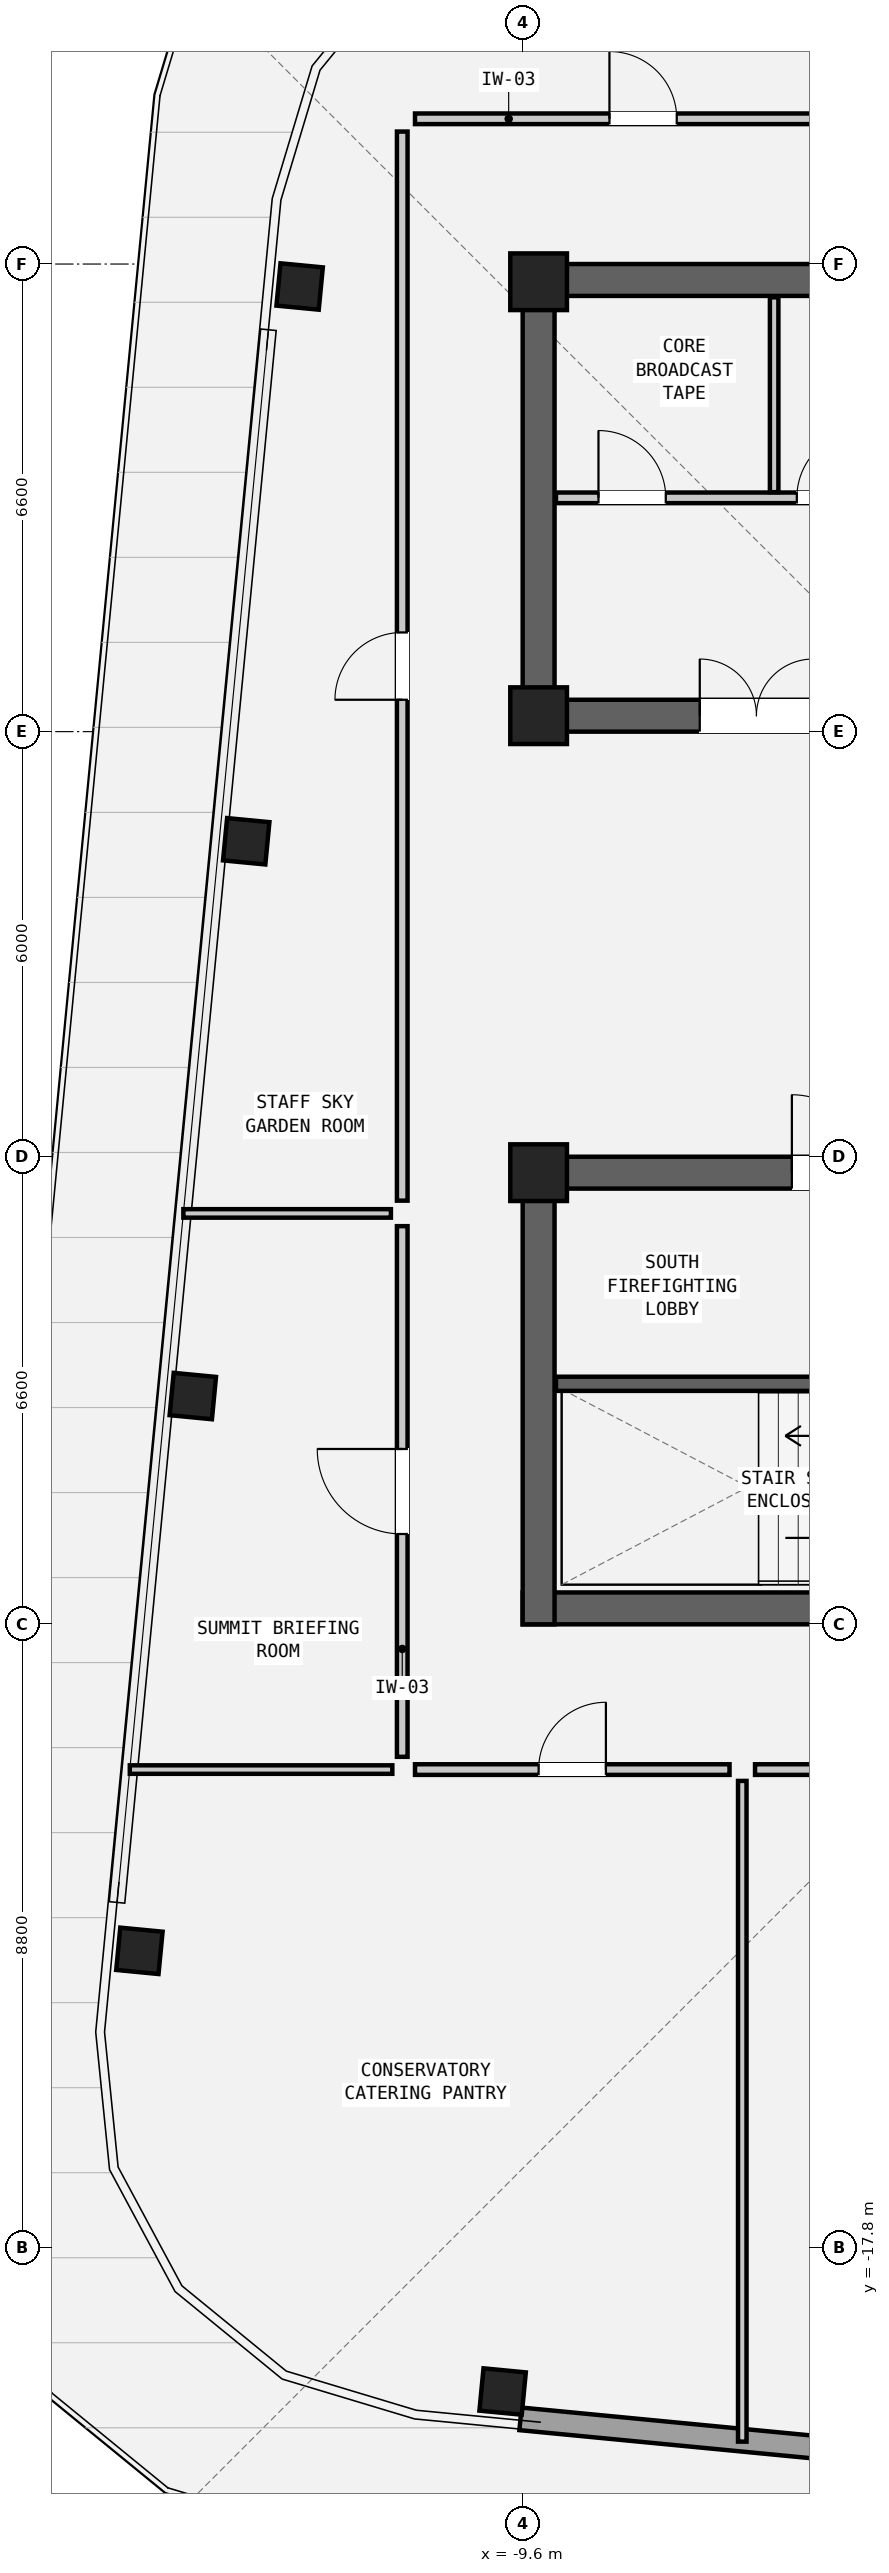
"""IFC4 building model, lengths in metres.
Left out: names, types, materials, properties, quantities, classifications, styles, units other than length and angle.
Written with IfcOpenShell. Run it as: python <this file> out.ifc"""

import sys

from ifc_helpers import new_model, si_unit, direction, frame, frame_2d, origin, origin_2d, place, context, subcontext, project, spatial, rectangle, hollow_rectangle, extrude, element, fill, save


model = new_model("IFC4")
c1 = context("Model", 3, precision=1e-05, world=origin(), true_north=direction((0.0, 1.0)))
c2 = subcontext(c1, "Body", "Model", "MODEL_VIEW")
j1 = project(units=[si_unit("LENGTHUNIT", "METRE"), si_unit("PLANEANGLEUNIT", "RADIAN")], contexts=[c1])
p1 = place(None, origin())
s1 = spatial("IfcSite", under=j1, at=p1, CompositionType="ELEMENT")
p2 = place(p1, origin())
s2 = spatial("IfcBuilding", under=s1, at=p2, CompositionType="ELEMENT")
p3 = place(p2, frame((0.0, 0.0, 273.35)))
s3 = spatial("IfcBuildingStorey", under=s2, at=p3, CompositionType="ELEMENT", Elevation=273.35)
p4 = place(p3, frame((-9.6, 9.975, 0.0), z_axis=(0.0, 0.0, 1.0), x_axis=(1.0, 0.0, 0.0)))
e1 = element("IfcWall", 1, at=p4, inside=s3, PredefinedType="SHEAR", context=c2, shape_type="SweptSolid", body=[
    extrude(rectangle(XDim=19.2, YDim=0.45, at=frame_2d((9.6, 0.0))), origin(), (0.0, 0.0, 1.0), 3.6),
])
p5 = place(p3, frame((-9.6, 3.825, 0.0), z_axis=(0.0, 0.0, 1.0), x_axis=(1.0, 0.0, 0.0)))
e2 = element("IfcWall", 2, at=p5, inside=s3, PredefinedType="SHEAR", context=c2, shape_type="SweptSolid", body=[
    extrude(rectangle(XDim=19.2, YDim=0.45, at=frame_2d((9.6, 0.0))), origin(), (0.0, 0.0, 1.0), 3.6),
])
p6 = place(p5, frame((14.2, 0.0, 0.0)))
e3 = element("IfcOpeningElement", 3, at=p6, cuts=e2, PredefinedType="OPENING", context=c2, shape_type="SweptSolid", body=[
    extrude(rectangle(XDim=1.1, YDim=2.08, at=frame_2d((0.55, 1.04))), frame((0.0, 0.237, 0.0), z_axis=(0.0, -1.0, 0.0), x_axis=(1.0, 0.0, 0.0)), (0.0, 0.0, 1.0), 0.474),
])
p7 = place(p5, frame((8.2, 0.0, 0.0)))
e4 = element("IfcOpeningElement", 4, at=p7, cuts=e2, PredefinedType="OPENING", context=c2, shape_type="SweptSolid", body=[
    extrude(rectangle(XDim=1.15, YDim=2.1, at=frame_2d((0.575, 1.05))), frame((0.0, 0.237, 0.0), z_axis=(0.0, -1.0, 0.0), x_axis=(1.0, 0.0, 0.0)), (0.0, 0.0, 1.0), 0.474),
])
p8 = place(p5, frame((2.5, 0.0, 0.0)))
e5 = element("IfcOpeningElement", 5, at=p8, cuts=e2, PredefinedType="OPENING", context=c2, shape_type="SweptSolid", body=[
    extrude(rectangle(XDim=1.6, YDim=2.12, at=frame_2d((0.8, 1.06))), frame((0.0, 0.237, 0.0), z_axis=(0.0, -1.0, 0.0), x_axis=(1.0, 0.0, 0.0)), (0.0, 0.0, 1.0), 0.474),
])
p9 = place(p3, frame((-9.375, 3.6, 0.0), z_axis=(0.0, 0.0, 1.0), x_axis=(0.0, 1.0, 0.0)))
e6 = element("IfcWall", 6, at=p9, inside=s3, PredefinedType="SHEAR", context=c2, shape_type="SweptSolid", body=[
    extrude(rectangle(XDim=6.6, YDim=0.45, at=frame_2d((3.3, 0.0))), origin(), (0.0, 0.0, 1.0), 3.6),
])
p10 = place(p3, frame((-9.6, -8.775, 0.0), z_axis=(0.0, 0.0, 1.0), x_axis=(1.0, 0.0, 0.0)))
e7 = element("IfcWall", 7, at=p10, inside=s3, PredefinedType="SHEAR", context=c2, shape_type="SweptSolid", body=[
    extrude(rectangle(XDim=19.2, YDim=0.45, at=frame_2d((9.6, 0.0))), origin(), (0.0, 0.0, 1.0), 3.6),
])
p11 = place(p3, frame((-9.6, -2.625, 0.0), z_axis=(0.0, 0.0, 1.0), x_axis=(1.0, 0.0, 0.0)))
e8 = element("IfcWall", 8, at=p11, inside=s3, PredefinedType="SHEAR", context=c2, shape_type="SweptSolid", body=[
    extrude(rectangle(XDim=19.2, YDim=0.45, at=frame_2d((9.6, 0.0))), origin(), (0.0, 0.0, 1.0), 3.6),
])
p12 = place(p11, frame((3.8, 0.0, 0.0)))
e9 = element("IfcOpeningElement", 9, at=p12, cuts=e8, PredefinedType="OPENING", context=c2, shape_type="SweptSolid", body=[
    extrude(rectangle(XDim=1.1, YDim=2.08, at=frame_2d((0.55, 1.04))), frame((0.0, 0.237, 0.0), z_axis=(0.0, -1.0, 0.0), x_axis=(1.0, 0.0, 0.0)), (0.0, 0.0, 1.0), 0.474),
])
p13 = place(p11, frame((10.15, 0.0, 0.0)))
e10 = element("IfcOpeningElement", 10, at=p13, cuts=e8, PredefinedType="OPENING", context=c2, shape_type="SweptSolid", body=[
    extrude(rectangle(XDim=0.9, YDim=2.05, at=frame_2d((0.45, 1.025))), frame((0.0, 0.237, 0.0), z_axis=(0.0, -1.0, 0.0), x_axis=(1.0, 0.0, 0.0)), (0.0, 0.0, 1.0), 0.474),
])
p14 = place(p11, frame((12.1, 0.0, 0.0)))
e11 = element("IfcOpeningElement", 11, at=p14, cuts=e8, PredefinedType="OPENING", context=c2, shape_type="SweptSolid", body=[
    extrude(rectangle(XDim=0.95, YDim=2.1, at=frame_2d((0.475, 1.05))), frame((0.0, 0.237, 0.0), z_axis=(0.0, -1.0, 0.0), x_axis=(1.0, 0.0, 0.0)), (0.0, 0.0, 1.0), 0.474),
])
p15 = place(p11, frame((14.8, 0.0, 0.0)))
e12 = element("IfcOpeningElement", 12, at=p15, cuts=e8, PredefinedType="OPENING", context=c2, shape_type="SweptSolid", body=[
    extrude(rectangle(XDim=1.6, YDim=2.12, at=frame_2d((0.8, 1.06))), frame((0.0, 0.237, 0.0), z_axis=(0.0, -1.0, 0.0), x_axis=(1.0, 0.0, 0.0)), (0.0, 0.0, 1.0), 0.474),
])
p16 = place(p3, frame((-9.375, -9.0, 0.0), z_axis=(0.0, 0.0, 1.0), x_axis=(0.0, 1.0, 0.0)))
e13 = element("IfcWall", 13, at=p16, inside=s3, PredefinedType="SHEAR", context=c2, shape_type="SweptSolid", body=[
    extrude(rectangle(XDim=6.6, YDim=0.45, at=frame_2d((3.3, 0.0))), origin(), (0.0, 0.0, 1.0), 3.6),
])
for number, where, z_axis, x_axis in (
    (14, (-9.883, -19.829, 0.0), (0.0, 0.0, 1.0), (0.995, -0.096, 0.0)),
    (15, (-12.749, 9.883, 0.0), (0.0, 0.0, 1.0), (0.096, 0.995, 0.0)),
    (16, (-13.502, 2.052, 0.0), (0.0, 0.0, 1.0), (0.096, 0.995, 0.0)),
    (17, (-14.256, -5.778, 0.0), (0.0, 0.0, 1.0), (0.096, 0.995, 0.0)),
    (18, (-15.01, -13.608, 0.0), (0.0, 0.0, 1.0), (0.096, 0.995, 0.0)),
):
    element("IfcColumn", number, at=place(p3, frame(where, z_axis=z_axis, x_axis=x_axis)), inside=s3, PredefinedType="COLUMN", context=c2, shape_type="SweptSolid", body=[
        extrude(hollow_rectangle(XDim=0.6, YDim=0.6, WallThickness=0.04, at=origin_2d()), origin(), (0.0, 0.0, 1.0), 3.6),
    ])
for number, where, z_axis, x_axis in (
    (19, (-9.375, 9.95, 0.0), (0.0, 0.0, 1.0), (1.0, 0.0, 0.0)),
    (20, (-9.375, 3.825, 0.0), (0.0, 0.0, 1.0), (1.0, 0.0, 0.0)),
    (21, (-9.375, -2.625, 0.0), (0.0, 0.0, 1.0), (1.0, 0.0, 0.0)),
):
    element("IfcColumn", number, at=place(p3, frame(where, z_axis=z_axis, x_axis=x_axis)), inside=s3, PredefinedType="COLUMN", context=c2, shape_type="SweptSolid", body=[
        extrude(rectangle(XDim=0.8, YDim=0.8, at=origin_2d()), origin(), (0.0, 0.0, 1.0), 3.6),
    ])
p17 = place(p3, frame((13.287, -22.421, 0.0), z_axis=(0.0, 0.0, 1.0), x_axis=(-0.995396042099, 0.095847375411, 0.0)))
e22 = element("IfcWall", 22, at=p17, inside=s3, PredefinedType="SOLIDWALL", context=c2, shape_type="SweptSolid", body=[
    extrude(rectangle(XDim=23.024, YDim=0.32, at=frame_2d((11.512, 0.0))), origin(), (0.0, 0.0, 1.0), 2.984),
])
p18 = place(p17, frame((3.811, 0.0, 0.0)))
e23 = element("IfcOpeningElement", 23, at=p18, cuts=e22, PredefinedType="OPENING", context=c2, shape_type="SweptSolid", body=[
    extrude(rectangle(XDim=1.25, YDim=2.02, at=frame_2d((0.625, 1.01))), frame((0.0, 0.172, 0.0), z_axis=(0.0, -1.0, 0.0), x_axis=(1.0, 0.0, 0.0)), (0.0, 0.0, 1.0), 0.344),
])
p19 = place(p3, frame((-9.13, 6.9, 0.0), z_axis=(0.0, 0.0, 1.0), x_axis=(1.0, 0.0, 0.0)))
e24 = element("IfcWall", 24, at=p19, inside=s3, PredefinedType="PARTITIONING", context=c2, shape_type="SweptSolid", body=[
    extrude(rectangle(XDim=6.01, YDim=0.15, at=frame_2d((3.005, 0.0))), origin(), (0.0, 0.0, 1.0), 3.41),
])
p20 = place(p19, frame((0.6, 0.0, 0.0)))
e25 = element("IfcOpeningElement", 25, at=p20, cuts=e24, PredefinedType="OPENING", context=c2, shape_type="SweptSolid", body=[
    extrude(rectangle(XDim=0.95, YDim=2.1, at=frame_2d((0.475, 1.05))), frame((0.0, 0.087, 0.0), z_axis=(0.0, -1.0, 0.0), x_axis=(1.0, 0.0, 0.0)), (0.0, 0.0, 1.0), 0.174),
])
p21 = place(p19, frame((3.4, 0.0, 0.0)))
e26 = element("IfcOpeningElement", 26, at=p21, cuts=e24, PredefinedType="OPENING", context=c2, shape_type="SweptSolid", body=[
    extrude(rectangle(XDim=0.95, YDim=2.1, at=frame_2d((0.475, 1.05))), frame((0.0, 0.087, 0.0), z_axis=(0.0, -1.0, 0.0), x_axis=(1.0, 0.0, 0.0)), (0.0, 0.0, 1.0), 0.174),
])
p22 = place(p3, frame((-6.05, 6.98, 0.0), z_axis=(0.0, 0.0, 1.0), x_axis=(0.0, 1.0, 0.0)))
e27 = element("IfcWall", 27, at=p22, inside=s3, PredefinedType="PARTITIONING", context=c2, shape_type="SweptSolid", body=[
    extrude(rectangle(XDim=2.75, YDim=0.12, at=frame_2d((1.375, 0.0))), origin(), (0.0, 0.0, 1.0), 3.41),
])
p23 = place(p3, frame((-9.13, -5.605, 0.0), z_axis=(0.0, 0.0, 1.0), x_axis=(1.0, 0.0, 0.0)))
e28 = element("IfcWall", 28, at=p23, inside=s3, PredefinedType="SHEAR", context=c2, shape_type="SweptSolid", body=[
    extrude(rectangle(XDim=6.77, YDim=0.2, at=frame_2d((3.385, 0.0))), origin(), (0.0, 0.0, 1.0), 3.41),
])
p24 = place(p23, frame((5.5, 0.0, 0.0)))
e29 = element("IfcOpeningElement", 29, at=p24, cuts=e28, PredefinedType="OPENING", context=c2, shape_type="SweptSolid", body=[
    extrude(rectangle(XDim=1.05, YDim=2.08, at=frame_2d((0.525, 1.04))), frame((0.0, 0.112, 0.0), z_axis=(0.0, -1.0, 0.0), x_axis=(1.0, 0.0, 0.0)), (0.0, 0.0, 1.0), 0.224),
])
p25 = place(p3, frame((-15.146, -11.05, 0.0), z_axis=(0.0, 0.0, 1.0), x_axis=(1.0, 0.0, 0.0)))
e30 = element("IfcWall", 30, at=p25, inside=s3, PredefinedType="PARTITIONING", context=c2, shape_type="SweptSolid", body=[
    extrude(rectangle(XDim=3.706, YDim=0.12, at=frame_2d((1.853, 0.0))), origin(), (0.0, 0.0, 1.0), 3.41),
])
p26 = place(p3, frame((-6.5, -20.536, 0.0), z_axis=(0.0, 0.0, 1.0), x_axis=(0.0, 1.0, 0.0)))
e31 = element("IfcWall", 31, at=p26, inside=s3, PredefinedType="PARTITIONING", context=c2, shape_type="SweptSolid", body=[
    extrude(rectangle(XDim=9.326, YDim=0.12, at=frame_2d((4.663, 0.0))), origin(), (0.0, 0.0, 1.0), 2.931),
])
p27 = place(p3, frame((-14.39, -3.2, 0.0), z_axis=(0.0, 0.0, 1.0), x_axis=(1.0, 0.0, 0.0)))
e32 = element("IfcWall", 32, at=p27, inside=s3, PredefinedType="PARTITIONING", context=c2, shape_type="SweptSolid", body=[
    extrude(rectangle(XDim=2.93, YDim=0.12, at=frame_2d((1.465, 0.0))), origin(), (0.0, 0.0, 1.0), 3.41),
])
p28 = place(p3, frame((-11.12, 12.25, 0.0), z_axis=(0.0, 0.0, 1.0), x_axis=(1.0, 0.0, 0.0)))
e33 = element("IfcWall", 33, at=p28, inside=s3, PredefinedType="PARTITIONING", context=c2, shape_type="SweptSolid", body=[
    extrude(rectangle(XDim=6.44, YDim=0.15, at=frame_2d((3.22, 0.0))), origin(), (0.0, 0.0, 1.0), 3.41),
])
p29 = place(p28, frame((2.745, 0.0, 0.0)))
e34 = element("IfcOpeningElement", 34, at=p29, cuts=e33, PredefinedType="OPENING", context=c2, shape_type="SweptSolid", body=[
    extrude(rectangle(XDim=0.95, YDim=2.1, at=frame_2d((0.475, 1.05))), frame((0.0, 0.087, 0.0), z_axis=(0.0, -1.0, 0.0), x_axis=(1.0, 0.0, 0.0)), (0.0, 0.0, 1.0), 0.174),
])
p30 = place(p3, frame((-11.12, -11.05, 0.0), z_axis=(0.0, 0.0, 1.0), x_axis=(1.0, 0.0, 0.0)))
e35 = element("IfcWall", 35, at=p30, inside=s3, PredefinedType="PARTITIONING", context=c2, shape_type="SweptSolid", body=[
    extrude(rectangle(XDim=4.44, YDim=0.15, at=frame_2d((2.22, 0.0))), origin(), (0.0, 0.0, 1.0), 3.41),
])
p31 = place(p30, frame((1.745, 0.0, 0.0)))
e36 = element("IfcOpeningElement", 36, at=p31, cuts=e35, PredefinedType="OPENING", context=c2, shape_type="SweptSolid", body=[
    extrude(rectangle(XDim=0.95, YDim=2.1, at=frame_2d((0.475, 1.05))), frame((0.0, 0.087, 0.0), z_axis=(0.0, -1.0, 0.0), x_axis=(1.0, 0.0, 0.0)), (0.0, 0.0, 1.0), 0.174),
])
p32 = place(p3, frame((-6.32, -11.05, 0.0), z_axis=(0.0, 0.0, 1.0), x_axis=(1.0, 0.0, 0.0)))
e37 = element("IfcWall", 37, at=p32, inside=s3, PredefinedType="PARTITIONING", context=c2, shape_type="SweptSolid", body=[
    extrude(rectangle(XDim=6.14, YDim=0.15, at=frame_2d((3.07, 0.0))), origin(), (0.0, 0.0, 1.0), 3.41),
])
p33 = place(p32, frame((2.595, 0.0, 0.0)))
e38 = element("IfcOpeningElement", 38, at=p33, cuts=e37, PredefinedType="OPENING", context=c2, shape_type="SweptSolid", body=[
    extrude(rectangle(XDim=0.95, YDim=2.1, at=frame_2d((0.475, 1.05))), frame((0.0, 0.087, 0.0), z_axis=(0.0, -1.0, 0.0), x_axis=(1.0, 0.0, 0.0)), (0.0, 0.0, 1.0), 0.174),
])
p34 = place(p3, frame((-11.3, -10.87, 0.0), z_axis=(0.0, 0.0, 1.0), x_axis=(0.0, 1.0, 0.0)))
e39 = element("IfcWall", 39, at=p34, inside=s3, PredefinedType="PARTITIONING", context=c2, shape_type="SweptSolid", body=[
    extrude(rectangle(XDim=7.49, YDim=0.15, at=frame_2d((3.745, 0.0))), origin(), (0.0, 0.0, 1.0), 3.41),
])
p35 = place(p34, frame((3.145, 0.0, 0.0)))
e40 = element("IfcOpeningElement", 40, at=p35, cuts=e39, PredefinedType="OPENING", context=c2, shape_type="SweptSolid", body=[
    extrude(rectangle(XDim=1.2, YDim=2.1, at=frame_2d((0.6, 1.05))), frame((0.0, 0.087, 0.0), z_axis=(0.0, -1.0, 0.0), x_axis=(1.0, 0.0, 0.0)), (0.0, 0.0, 1.0), 0.174),
])
p36 = place(p3, frame((-11.3, -3.02, 0.0), z_axis=(0.0, 0.0, 1.0), x_axis=(0.0, 1.0, 0.0)))
e41 = element("IfcWall", 41, at=p36, inside=s3, PredefinedType="PARTITIONING", context=c2, shape_type="SweptSolid", body=[
    extrude(rectangle(XDim=15.09, YDim=0.15, at=frame_2d((7.545, 0.0))), origin(), (0.0, 0.0, 1.0), 3.41),
])
p37 = place(p36, frame((7.07, 0.0, 0.0)))
e42 = element("IfcOpeningElement", 42, at=p37, cuts=e41, PredefinedType="OPENING", context=c2, shape_type="SweptSolid", body=[
    extrude(rectangle(XDim=0.95, YDim=2.1, at=frame_2d((0.475, 1.05))), frame((0.0, 0.087, 0.0), z_axis=(0.0, -1.0, 0.0), x_axis=(1.0, 0.0, 0.0)), (0.0, 0.0, 1.0), 0.174),
])
p38 = place(p8, origin())
e43 = element("IfcDoor", 43, at=p38, inside=s3, OperationType="DOUBLE_DOOR_SINGLE_SWING", PredefinedType="DOOR", context=c2, shape_type="SweptSolid", body=[
    extrude(rectangle(XDim=1.6, YDim=2.12, at=frame_2d((0.8, 1.06))), frame((0.0, 0.025, 0.0), z_axis=(0.0, -1.0, 0.0), x_axis=(1.0, 0.0, 0.0)), (0.0, 0.0, 1.0), 0.05),
])
fill(e5, e43)
p39 = place(p20, origin())
e44 = element("IfcDoor", 44, at=p39, inside=s3, OperationType="SINGLE_SWING_LEFT", PredefinedType="DOOR", context=c2, shape_type="SweptSolid", body=[
    extrude(rectangle(XDim=0.95, YDim=2.1, at=frame_2d((0.475, 1.05))), frame((0.0, 0.025, 0.0), z_axis=(0.0, -1.0, 0.0), x_axis=(1.0, 0.0, 0.0)), (0.0, 0.0, 1.0), 0.05),
])
fill(e25, e44)
p40 = place(p21, origin())
e45 = element("IfcDoor", 45, at=p40, inside=s3, OperationType="SINGLE_SWING_RIGHT", PredefinedType="DOOR", context=c2, shape_type="SweptSolid", body=[
    extrude(rectangle(XDim=0.95, YDim=2.1, at=frame_2d((0.475, 1.05))), frame((0.0, 0.025, 0.0), z_axis=(0.0, -1.0, 0.0), x_axis=(1.0, 0.0, 0.0)), (0.0, 0.0, 1.0), 0.05),
])
fill(e26, e45)
p41 = place(p12, origin())
e46 = element("IfcDoor", 46, at=p41, inside=s3, OperationType="SINGLE_SWING_LEFT", PredefinedType="DOOR", context=c2, shape_type="SweptSolid", body=[
    extrude(rectangle(XDim=1.1, YDim=2.08, at=frame_2d((0.55, 1.04))), frame((0.0, 0.025, 0.0), z_axis=(0.0, -1.0, 0.0), x_axis=(1.0, 0.0, 0.0)), (0.0, 0.0, 1.0), 0.05),
])
fill(e9, e46)
p42 = place(p29, origin())
e47 = element("IfcDoor", 47, at=p42, inside=s3, OperationType="SINGLE_SWING_LEFT", PredefinedType="DOOR", context=c2, shape_type="SweptSolid", body=[
    extrude(rectangle(XDim=0.95, YDim=2.1, at=frame_2d((0.475, 1.05))), frame((0.0, 0.025, 0.0), z_axis=(0.0, -1.0, 0.0), x_axis=(1.0, 0.0, 0.0)), (0.0, 0.0, 1.0), 0.05),
])
fill(e34, e47)
p43 = place(p31, origin())
e48 = element("IfcDoor", 48, at=p43, inside=s3, OperationType="SINGLE_SWING_RIGHT", PredefinedType="DOOR", context=c2, shape_type="SweptSolid", body=[
    extrude(rectangle(XDim=0.95, YDim=2.1, at=frame_2d((0.475, 1.05))), frame((0.0, 0.025, 0.0), z_axis=(0.0, -1.0, 0.0), x_axis=(1.0, 0.0, 0.0)), (0.0, 0.0, 1.0), 0.05),
])
fill(e36, e48)
p44 = place(p35, origin())
e49 = element("IfcDoor", 49, at=p44, inside=s3, OperationType="SINGLE_SWING_RIGHT", PredefinedType="DOOR", context=c2, shape_type="SweptSolid", body=[
    extrude(rectangle(XDim=1.2, YDim=2.1, at=frame_2d((0.6, 1.05))), frame((0.0, 0.025, 0.0), z_axis=(0.0, -1.0, 0.0), x_axis=(1.0, 0.0, 0.0)), (0.0, 0.0, 1.0), 0.05),
])
fill(e40, e49)
p45 = place(p37, origin())
e50 = element("IfcDoor", 50, at=p45, inside=s3, OperationType="SINGLE_SWING_LEFT", PredefinedType="DOOR", context=c2, shape_type="SweptSolid", body=[
    extrude(rectangle(XDim=0.95, YDim=2.1, at=frame_2d((0.475, 1.05))), frame((0.0, 0.025, 0.0), z_axis=(0.0, -1.0, 0.0), x_axis=(1.0, 0.0, 0.0)), (0.0, 0.0, 1.0), 0.05),
])
fill(e42, e50)
save(model, sys.argv[1])
